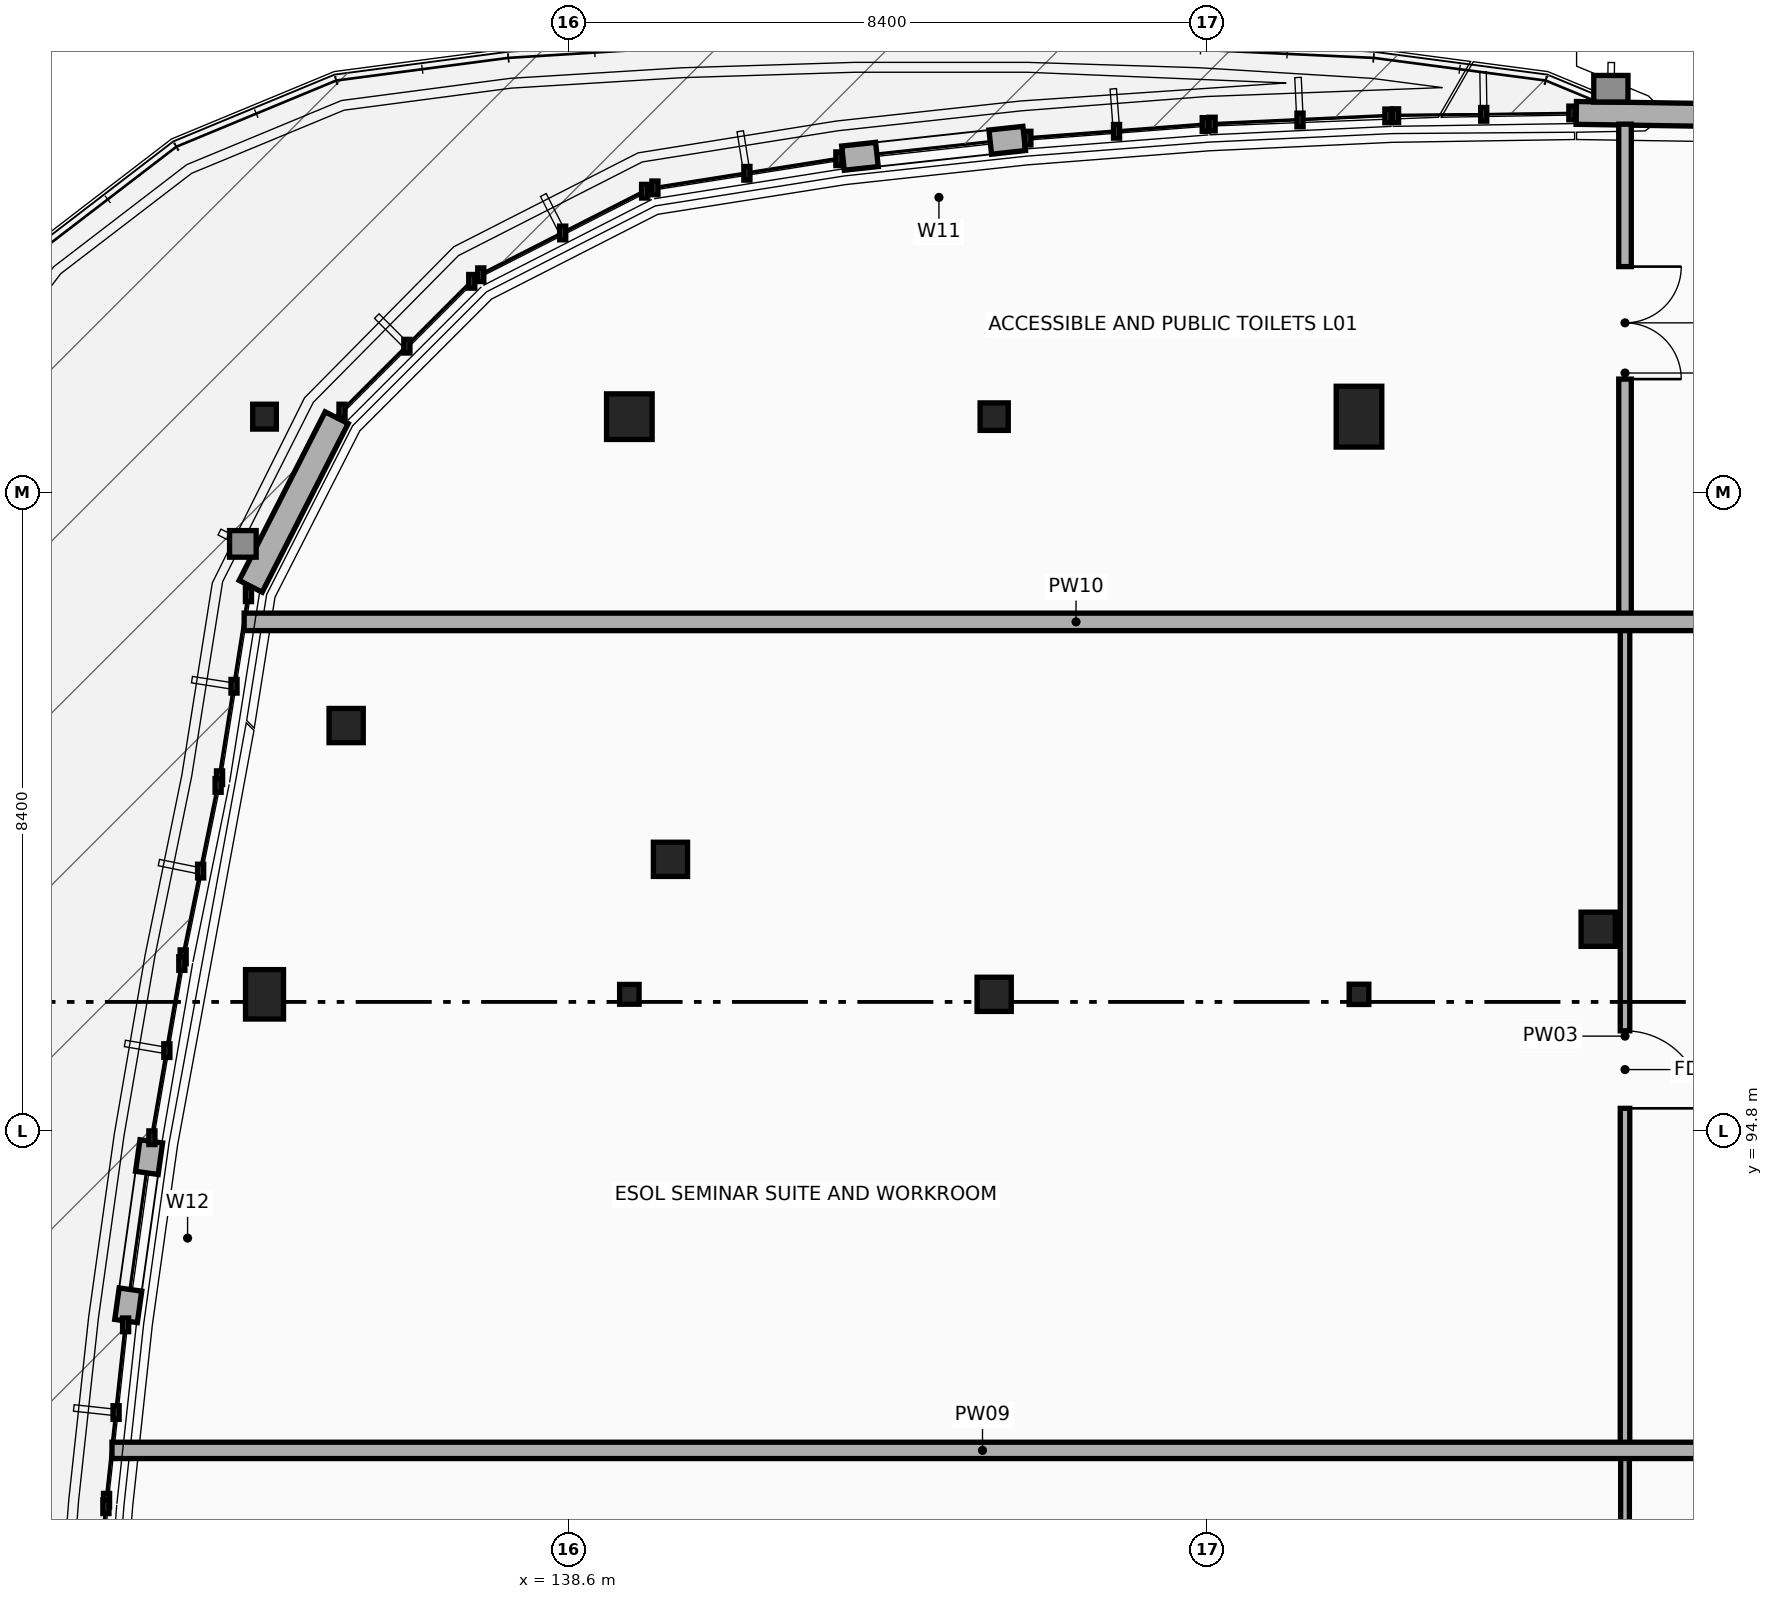
"""IFC4 building model, lengths in metres.
Left out: names, types, materials, properties, quantities, classifications, styles, units other than length and angle.
Written with IfcOpenShell. Run it as: python <this file> out.ifc"""

import sys

from ifc_helpers import new_model, si_unit, direction, frame, frame_2d, origin, origin_2d, place, context, subcontext, project, spatial, rectangle, i_section, extrude, element, fill, save


model = new_model("IFC4")
c1 = context("Model", 3, precision=1e-05, world=origin(), true_north=direction((0.0, 1.0)))
c2 = subcontext(c1, "Body", "Model", "MODEL_VIEW")
j1 = project(units=[si_unit("LENGTHUNIT", "METRE"), si_unit("PLANEANGLEUNIT", "RADIAN")], contexts=[c1])
p1 = place(None, origin())
s1 = spatial("IfcSite", under=j1, at=p1, CompositionType="ELEMENT")
p2 = place(p1, origin())
s2 = spatial("IfcBuilding", under=s1, at=p2, CompositionType="ELEMENT")
p3 = place(p2, frame((0.0, 0.0, 4.8)))
s3 = spatial("IfcBuildingStorey", under=s2, at=p3, CompositionType="ELEMENT", Elevation=4.8)
p4 = place(p3, frame((134.6, 96.6, 0.0), z_axis=(0.0, 0.0, 1.0), x_axis=(1.0, 0.0, 0.0)))
e1 = element("IfcColumn", 1, at=p4, inside=s3, PredefinedType="COLUMN", context=c2, shape_type="SweptSolid", body=[
    extrude(rectangle(XDim=0.5, YDim=0.65, at=origin_2d()), origin(), (0.0, 0.0, 1.0), 3.9),
])
p5 = place(p3, frame((134.6, 104.2, 0.0), z_axis=(0.0, 0.0, 1.0), x_axis=(1.0, 0.0, 0.0)))
e2 = element("IfcColumn", 2, at=p5, inside=s3, PredefinedType="COLUMN", context=c2, shape_type="SweptSolid", body=[
    extrude(i_section(OverallWidth=0.311, OverallDepth=0.327, WebThickness=0.016, FlangeThickness=0.025, at=origin_2d()), origin(), (0.0, 0.0, 1.0), 3.9),
])
p6 = place(p3, frame((139.4, 96.6, 0.0), z_axis=(0.0, 0.0, 1.0), x_axis=(1.0, 0.0, 0.0)))
e3 = element("IfcColumn", 3, at=p6, inside=s3, PredefinedType="COLUMN", context=c2, shape_type="SweptSolid", body=[
    extrude(i_section(OverallWidth=0.256, OverallDepth=0.26, WebThickness=0.01, FlangeThickness=0.017, at=origin_2d()), origin(), (0.0, 0.0, 1.0), 3.9),
])
p7 = place(p3, frame((139.4, 104.2, 0.0), z_axis=(0.0, 0.0, 1.0), x_axis=(1.0, 0.0, 0.0)))
e4 = element("IfcColumn", 4, at=p7, inside=s3, PredefinedType="COLUMN", context=c2, shape_type="SweptSolid", body=[
    extrude(rectangle(XDim=0.6, YDim=0.6, at=origin_2d()), origin(), (0.0, 0.0, 1.0), 3.9),
])
p8 = place(p3, frame((144.2, 96.6, 0.0), z_axis=(0.0, 0.0, 1.0), x_axis=(1.0, 0.0, 0.0)))
e5 = element("IfcColumn", 5, at=p8, inside=s3, PredefinedType="COLUMN", context=c2, shape_type="SweptSolid", body=[
    extrude(rectangle(XDim=0.45, YDim=0.45, at=origin_2d()), origin(), (0.0, 0.0, 1.0), 3.9),
])
p9 = place(p3, frame((144.2, 104.2, 0.0), z_axis=(0.0, 0.0, 1.0), x_axis=(1.0, 0.0, 0.0)))
e6 = element("IfcColumn", 6, at=p9, inside=s3, PredefinedType="COLUMN", context=c2, shape_type="SweptSolid", body=[
    extrude(i_section(OverallWidth=0.371, OverallDepth=0.362, WebThickness=0.012, FlangeThickness=0.021, at=origin_2d()), origin(), (0.0, 0.0, 1.0), 3.9),
])
p10 = place(p3, frame((149.0, 96.6, 0.0), z_axis=(0.0, 0.0, 1.0), x_axis=(1.0, 0.0, 0.0)))
e7 = element("IfcColumn", 7, at=p10, inside=s3, PredefinedType="COLUMN", context=c2, shape_type="SweptSolid", body=[
    extrude(i_section(OverallWidth=0.259, OverallDepth=0.267, WebThickness=0.013, FlangeThickness=0.021, at=origin_2d()), origin(), (0.0, 0.0, 1.0), 3.9),
])
p11 = place(p3, frame((149.0, 104.2, 0.0), z_axis=(0.0, 0.0, 1.0), x_axis=(1.0, 0.0, 0.0)))
e8 = element("IfcColumn", 8, at=p11, inside=s3, PredefinedType="COLUMN", context=c2, shape_type="SweptSolid", body=[
    extrude(rectangle(XDim=0.6, YDim=0.8, at=origin_2d()), origin(), (0.0, 0.0, 1.0), 3.9),
])
p12 = place(p3, frame((135.674, 100.136, 0.0), z_axis=(0.0, 0.0, 1.0), x_axis=(1.0, 0.0, 0.0)))
e9 = element("IfcColumn", 9, at=p12, inside=s3, PredefinedType="COLUMN", context=c2, shape_type="SweptSolid", body=[
    extrude(rectangle(XDim=0.45, YDim=0.45, at=origin_2d()), origin(), (0.0, 0.0, 1.0), 3.653),
])
for number, where, z_axis, x_axis in (
    (10, (139.941, 98.376, 0.0), (0.0, 0.0, 1.0), (1.0, 0.0, 0.0)),
    (11, (152.147, 97.456, 0.0), (0.0, 0.0, 1.0), (1.0, 0.0, 0.0)),
):
    element("IfcColumn", number, at=place(p3, frame(where, z_axis=z_axis, x_axis=x_axis)), inside=s3, PredefinedType="COLUMN", context=c2, shape_type="SweptSolid", body=[
        extrude(rectangle(XDim=0.45, YDim=0.45, at=origin_2d()), origin(), (0.0, 0.0, 1.0), 3.9),
    ])
p13 = place(p3, frame((151.859, 108.196, 0.0), z_axis=(0.0, 0.0, 1.0), x_axis=(0.99988049559, -0.015459448208, 0.0)))
e12 = element("IfcWall", 12, at=p13, inside=s3, PredefinedType="STANDARD", context=c2, shape_type="SweptSolid", body=[
    extrude(rectangle(XDim=2.4, YDim=0.3, at=frame_2d((1.2, 0.0))), origin(), (0.0, 0.0, 1.0), 3.637),
])
p14 = place(p3, frame((142.211, 107.601, 0.0), z_axis=(0.0, 0.0, 1.0), x_axis=(0.994148979576, 0.108017620822, 0.0)))
e13 = element("IfcWall", 13, at=p14, inside=s3, PredefinedType="STANDARD", context=c2, shape_type="SweptSolid", body=[
    extrude(rectangle(XDim=2.398, YDim=0.32, at=frame_2d((1.199, 0.0))), origin(), (0.0, 0.0, 1.0), 3.637),
])
p15 = place(p14, frame((0.449, 0.0, 0.9)))
e14 = element("IfcOpeningElement", 14, at=p15, cuts=e13, PredefinedType="OPENING", context=c2, shape_type="SweptSolid", body=[
    extrude(rectangle(XDim=1.5, YDim=1.8, at=frame_2d((0.75, 0.9))), frame((0.0, 0.17, 0.0), z_axis=(0.0, -1.0, 0.0), x_axis=(1.0, 0.0, 0.0)), (0.0, 0.0, 1.0), 0.34),
])
p16 = place(p3, frame((134.418, 101.968, 0.0), z_axis=(0.0, 0.0, 1.0), x_axis=(0.454298846644, 0.890849346376, 0.0)))
e15 = element("IfcWall", 15, at=p16, inside=s3, PredefinedType="STANDARD", context=c2, shape_type="SweptSolid", body=[
    extrude(rectangle(XDim=2.49, YDim=0.34, at=frame_2d((1.245, 0.0))), origin(), (0.0, 0.0, 1.0), 3.216),
])
p17 = place(p3, frame((132.778, 92.302, 0.0), z_axis=(0.0, 0.0, 1.0), x_axis=(0.139087162472, 0.990280142806, 0.0)))
e16 = element("IfcWall", 16, at=p17, inside=s3, PredefinedType="STANDARD", context=c2, shape_type="SweptSolid", body=[
    extrude(rectangle(XDim=2.387, YDim=0.3, at=frame_2d((1.194, 0.0))), origin(), (0.0, 0.0, 1.0), 3.637),
])
p18 = place(p17, frame((0.418, 0.0, 0.9)))
e17 = element("IfcOpeningElement", 17, at=p18, cuts=e16, PredefinedType="OPENING", context=c2, shape_type="SweptSolid", body=[
    extrude(rectangle(XDim=1.55, YDim=1.65, at=frame_2d((0.775, 0.825))), frame((0.0, 0.16, 0.0), z_axis=(0.0, -1.0, 0.0), x_axis=(1.0, 0.0, 0.0)), (0.0, 0.0, 1.0), 0.32),
])
p19 = place(p3, frame((152.5, 90.6, 0.0), z_axis=(0.0, 0.0, 1.0), x_axis=(0.0, -1.0, 0.0)))
e18 = element("IfcWall", 18, at=p19, inside=s3, PredefinedType="PARTITIONING", context=c2, shape_type="SweptSolid", body=[
    extrude(rectangle(XDim=11.0, YDim=0.115, at=frame_2d((5.5, 0.0))), origin(), (0.0, 0.0, 1.0), 3.061),
])
p20 = place(p19, frame((4.81, 0.0, 0.0)))
e19 = element("IfcOpeningElement", 19, at=p20, cuts=e18, PredefinedType="OPENING", context=c2, shape_type="SweptSolid", body=[
    extrude(rectangle(XDim=1.38, YDim=2.2, at=frame_2d((0.69, 1.1))), frame((0.0, 0.067, 0.0), z_axis=(0.0, -1.0, 0.0), x_axis=(1.0, 0.0, 0.0)), (0.0, 0.0, 1.0), 0.135),
])
p21 = place(p3, frame((152.5, 101.5, 0.0), z_axis=(0.0, 0.0, 1.0), x_axis=(0.0, -1.0, 0.0)))
e20 = element("IfcWall", 20, at=p21, inside=s3, PredefinedType="PARTITIONING", context=c2, shape_type="SweptSolid", body=[
    extrude(rectangle(XDim=10.9, YDim=0.125, at=frame_2d((5.45, 0.0))), origin(), (0.0, 0.0, 1.0), 3.143),
])
p22 = place(p21, frame((5.38, 0.0, 0.0)))
e21 = element("IfcOpeningElement", 21, at=p22, cuts=e20, PredefinedType="OPENING", context=c2, shape_type="SweptSolid", body=[
    extrude(rectangle(XDim=1.02, YDim=2.14, at=frame_2d((0.51, 1.07))), frame((0.0, 0.073, 0.0), z_axis=(0.0, -1.0, 0.0), x_axis=(1.0, 0.0, 0.0)), (0.0, 0.0, 1.0), 0.145),
])
p23 = place(p3, frame((152.5, 108.048, 0.0), z_axis=(0.0, 0.0, 1.0), x_axis=(0.0, -1.0, 0.0)))
e22 = element("IfcWall", 22, at=p23, inside=s3, PredefinedType="PARTITIONING", context=c2, shape_type="SweptSolid", body=[
    extrude(rectangle(XDim=6.548, YDim=0.165, at=frame_2d((3.274, 0.0))), origin(), (0.0, 0.0, 1.0), 3.244),
])
p24 = place(p23, frame((1.874, 0.0, 0.0)))
e23 = element("IfcOpeningElement", 23, at=p24, cuts=e22, PredefinedType="OPENING", context=c2, shape_type="SweptSolid", body=[
    extrude(rectangle(XDim=1.48, YDim=2.22, at=frame_2d((0.74, 1.11))), frame((0.0, 0.093, 0.0), z_axis=(0.0, -1.0, 0.0), x_axis=(1.0, 0.0, 0.0)), (0.0, 0.0, 1.0), 0.185),
])
p25 = place(p3, frame((132.593, 90.6, 0.0), z_axis=(0.0, 0.0, 1.0), x_axis=(1.0, 0.0, 0.0)))
e24 = element("IfcWall", 24, at=p25, inside=s3, PredefinedType="PARTITIONING", context=c2, shape_type="SweptSolid", body=[
    extrude(rectangle(XDim=22.907, YDim=0.215, at=frame_2d((11.454, 0.0))), origin(), (0.0, 0.0, 1.0), 2.917),
])
p26 = place(p3, frame((134.332, 101.5, 0.0), z_axis=(0.0, 0.0, 1.0), x_axis=(1.0, 0.0, 0.0)))
e25 = element("IfcWall", 25, at=p26, inside=s3, PredefinedType="PARTITIONING", context=c2, shape_type="SweptSolid", body=[
    extrude(rectangle(XDim=21.89, YDim=0.23, at=frame_2d((10.945, 0.0))), origin(), (0.0, 0.0, 1.0), 2.913),
])
p27 = place(p15, origin())
e26 = element("IfcWindow", 26, at=p27, inside=s3, PartitioningType="SINGLE_PANEL", PredefinedType="WINDOW", context=c2, shape_type="SweptSolid", body=[
    extrude(rectangle(XDim=1.5, YDim=1.8, at=frame_2d((0.75, 0.9))), frame((0.0, 0.03, 0.0), z_axis=(0.0, -1.0, 0.0), x_axis=(1.0, 0.0, 0.0)), (0.0, 0.0, 1.0), 0.06),
])
fill(e14, e26)
p28 = place(p18, origin())
e27 = element("IfcWindow", 27, at=p28, inside=s3, PartitioningType="SINGLE_PANEL", PredefinedType="WINDOW", context=c2, shape_type="SweptSolid", body=[
    extrude(rectangle(XDim=1.55, YDim=1.65, at=frame_2d((0.775, 0.825))), frame((0.0, 0.03, 0.0), z_axis=(0.0, -1.0, 0.0), x_axis=(1.0, 0.0, 0.0)), (0.0, 0.0, 1.0), 0.06),
])
fill(e17, e27)
p29 = place(p22, origin())
e28 = element("IfcDoor", 28, at=p29, inside=s3, OperationType="SINGLE_SWING_RIGHT", PredefinedType="DOOR", context=c2, shape_type="SweptSolid", body=[
    extrude(rectangle(XDim=1.02, YDim=2.14, at=frame_2d((0.51, 1.07))), frame((0.0, 0.025, 0.0), z_axis=(0.0, -1.0, 0.0), x_axis=(1.0, 0.0, 0.0)), (0.0, 0.0, 1.0), 0.05),
])
fill(e21, e28)
p30 = place(p24, origin())
e29 = element("IfcDoor", 29, at=p30, inside=s3, OperationType="DOUBLE_DOOR_SINGLE_SWING", PredefinedType="DOOR", context=c2, shape_type="SweptSolid", body=[
    extrude(rectangle(XDim=1.48, YDim=2.22, at=frame_2d((0.74, 1.11))), frame((0.0, 0.025, 0.0), z_axis=(0.0, -1.0, 0.0), x_axis=(1.0, 0.0, 0.0)), (0.0, 0.0, 1.0), 0.05),
])
fill(e23, e29)
save(model, sys.argv[1])
